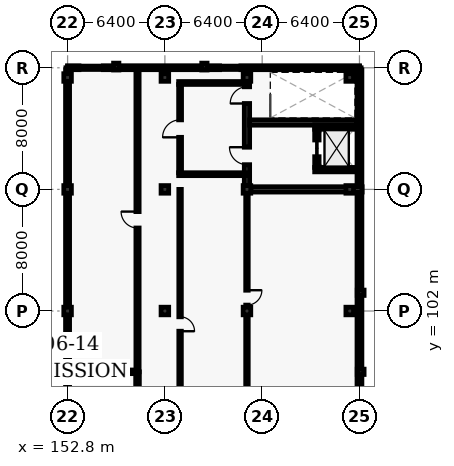
"""IFC4 building model, lengths in metres.
Left out: names, types, materials, properties, quantities, classifications, styles, units other than length and angle.
Written with IfcOpenShell. Run it as: python <this file> out.ifc"""

import sys

from ifc_helpers import new_model, si_unit, direction, frame, frame_2d, origin, origin_2d, place, context, subcontext, project, spatial, rectangle, extrude, element, fill, save


model = new_model("IFC4")
c1 = context("Model", 3, precision=1e-05, world=origin(), true_north=direction((0.0, 1.0)))
c2 = subcontext(c1, "Body", "Model", "MODEL_VIEW")
j1 = project(units=[si_unit("LENGTHUNIT", "METRE"), si_unit("PLANEANGLEUNIT", "RADIAN")], contexts=[c1])
p1 = place(None, origin())
s1 = spatial("IfcSite", under=j1, at=p1, CompositionType="ELEMENT")
p2 = place(p1, origin())
s2 = spatial("IfcBuilding", under=s1, at=p2, CompositionType="ELEMENT")
p3 = place(p2, frame((0.0, 0.0, 29.4)))
s3 = spatial("IfcBuildingStorey", under=s2, at=p3, CompositionType="ELEMENT", Elevation=29.4)
for number, where, z_axis, x_axis in (
    (1, (152.8, 102.0, 0.0), (0.0, 0.0, 1.0), (1.0, 0.0, 0.0)),
    (2, (152.8, 110.0, 0.0), (0.0, 0.0, 1.0), (1.0, 0.0, 0.0)),
    (3, (152.8, 117.36, 0.0), (0.0, 0.0, 1.0), (1.0, 0.0, 0.0)),
    (4, (159.2, 102.0, 0.0), (0.0, 0.0, 1.0), (1.0, 0.0, 0.0)),
    (5, (159.2, 110.0, 0.0), (0.0, 0.0, 1.0), (1.0, 0.0, 0.0)),
    (6, (159.2, 117.36, 0.0), (0.0, 0.0, 1.0), (1.0, 0.0, 0.0)),
    (7, (164.6, 102.0, 0.0), (0.0, 0.0, 1.0), (1.0, 0.0, 0.0)),
    (8, (164.6, 110.0, 0.0), (0.0, 0.0, 1.0), (1.0, 0.0, 0.0)),
    (9, (164.6, 117.36, 0.0), (0.0, 0.0, 1.0), (1.0, 0.0, 0.0)),
    (10, (171.36, 102.0, 0.0), (0.0, 0.0, 1.0), (1.0, 0.0, 0.0)),
    (11, (171.36, 110.0, 0.0), (0.0, 0.0, 1.0), (1.0, 0.0, 0.0)),
    (12, (171.36, 117.36, 0.0), (0.0, 0.0, 1.0), (1.0, 0.0, 0.0)),
):
    element("IfcColumn", number, at=place(p3, frame(where, z_axis=z_axis, x_axis=x_axis)), inside=s3, PredefinedType="COLUMN", context=c2, shape_type="SweptSolid", body=[
        extrude(rectangle(XDim=0.5, YDim=0.5, at=origin_2d()), origin(), (0.0, 0.0, 1.0), 4.5),
    ])
for number, where, z_axis, x_axis in (
    (13, (172.08, 98.0, 0.0), (0.0, 0.0, 1.0), (1.0, 0.0, 0.0)),
    (14, (172.08, 103.2, 0.0), (0.0, 0.0, 1.0), (1.0, 0.0, 0.0)),
    (15, (156.0, 118.08, 0.0), (0.0, 0.0, 1.0), (0.0, 1.0, 0.0)),
    (16, (161.8, 118.08, 0.0), (0.0, 0.0, 1.0), (0.0, 1.0, 0.0)),
):
    element("IfcColumn", number, at=place(p3, frame(where, z_axis=z_axis, x_axis=x_axis)), inside=s3, PredefinedType="PILASTER", context=c2, shape_type="SweptSolid", body=[
        extrude(rectangle(XDim=0.35, YDim=0.45, at=origin_2d()), origin(), (0.0, 0.0, 1.0), 4.5),
    ])
p4 = place(p3, frame((152.8, 118.0, 0.0), z_axis=(0.0, 0.0, 1.0), x_axis=(1.0, 0.0, 0.0)))
e17 = element("IfcWall", 17, at=p4, inside=s3, PredefinedType="SOLIDWALL", context=c2, shape_type="SweptSolid", body=[
    extrude(rectangle(XDim=19.2, YDim=0.25, at=frame_2d((9.6, 0.0))), origin(), (0.0, 0.0, 1.0), 4.255),
])
p5 = place(p4, frame((0.75, 0.0, 0.9)))
e18 = element("IfcOpeningElement", 18, at=p5, cuts=e17, PredefinedType="OPENING", context=c2, shape_type="SweptSolid", body=[
    extrude(rectangle(XDim=1.6, YDim=1.65, at=frame_2d((0.8, 0.825))), frame((0.0, 0.135, 0.0), z_axis=(0.0, -1.0, 0.0), x_axis=(1.0, 0.0, 0.0)), (0.0, 0.0, 1.0), 0.27),
])
p6 = place(p4, frame((10.0, 0.0, 0.9)))
e19 = element("IfcOpeningElement", 19, at=p6, cuts=e17, PredefinedType="OPENING", context=c2, shape_type="SweptSolid", body=[
    extrude(rectangle(XDim=1.4, YDim=2.1, at=frame_2d((0.7, 1.05))), frame((0.0, 0.135, 0.0), z_axis=(0.0, -1.0, 0.0), x_axis=(1.0, 0.0, 0.0)), (0.0, 0.0, 1.0), 0.27),
])
p7 = place(p3, frame((172.0, 117.86, 0.0), z_axis=(0.0, 0.0, 1.0), x_axis=(0.0, -1.0, 0.0)))
e20 = element("IfcWall", 20, at=p7, inside=s3, PredefinedType="SOLIDWALL", context=c2, shape_type="SweptSolid", body=[
    extrude(rectangle(XDim=46.12, YDim=0.32, at=frame_2d((23.06, 0.0))), origin(), (0.0, 0.0, 1.0), 4.255),
])
p8 = place(p3, frame((152.8, 71.74, 0.0), z_axis=(0.0, 0.0, 1.0), x_axis=(0.0, 1.0, 0.0)))
e21 = element("IfcWall", 21, at=p8, inside=s3, PredefinedType="SOLIDWALL", context=c2, shape_type="SweptSolid", body=[
    extrude(rectangle(XDim=46.12, YDim=0.25, at=frame_2d((23.06, 0.0))), origin(), (0.0, 0.0, 1.0), 3.405),
])
p9 = place(p3, frame((152.8, 118.0, 4.5), z_axis=(0.0, 0.0, 1.0), x_axis=(1.0, 0.0, 0.0)))
e22 = element("IfcWall", 22, at=p9, inside=s3, PredefinedType="PARAPET", context=c2, shape_type="SweptSolid", body=[
    extrude(rectangle(XDim=19.2, YDim=0.22, at=frame_2d((9.6, 0.0))), origin(), (0.0, 0.0, 1.0), 0.95),
])
for number, where, z_axis, x_axis in (
    (23, (172.0, 118.0, 4.5), (0.0, 0.0, 1.0), (0.0, -1.0, 0.0)),
    (24, (152.8, 71.6, 4.5), (0.0, 0.0, 1.0), (0.0, 1.0, 0.0)),
):
    element("IfcWall", number, at=place(p3, frame(where, z_axis=z_axis, x_axis=x_axis)), inside=s3, PredefinedType="PARAPET", context=c2, shape_type="SweptSolid", body=[
        extrude(rectangle(XDim=46.4, YDim=0.22, at=frame_2d((23.2, 0.0))), origin(), (0.0, 0.0, 1.0), 0.95),
    ])
p10 = place(p3, frame((164.852, 110.0, 0.0), z_axis=(0.0, 0.0, 1.0), x_axis=(1.0, 0.0, 0.0)))
e25 = element("IfcWall", 25, at=p10, inside=s3, PredefinedType="SHEAR", context=c2, shape_type="SweptSolid", body=[
    extrude(rectangle(XDim=7.323, YDim=0.35, at=frame_2d((3.662, 0.0))), origin(), (0.0, 0.0, 1.0), 4.255),
])
p11 = place(p3, frame((164.6, 110.252, 0.0), z_axis=(0.0, 0.0, 1.0), x_axis=(0.0, 1.0, 0.0)))
e26 = element("IfcWall", 26, at=p11, inside=s3, PredefinedType="SHEAR", context=c2, shape_type="SweptSolid", body=[
    extrude(rectangle(XDim=7.573, YDim=0.35, at=frame_2d((3.787, 0.0))), origin(), (0.0, 0.0, 1.0), 4.255),
])
p12 = place(p11, frame((5.398, 0.0, 0.0)))
e27 = element("IfcOpeningElement", 27, at=p12, cuts=e26, PredefinedType="OPENING", context=c2, shape_type="SweptSolid", body=[
    extrude(rectangle(XDim=1.1, YDim=2.15, at=frame_2d((0.55, 1.075))), frame((0.0, 0.185, 0.0), z_axis=(0.0, -1.0, 0.0), x_axis=(1.0, 0.0, 0.0)), (0.0, 0.0, 1.0), 0.37),
])
p13 = place(p11, frame((1.373, 0.0, 0.0)))
e28 = element("IfcOpeningElement", 28, at=p13, cuts=e26, PredefinedType="OPENING", context=c2, shape_type="SweptSolid", body=[
    extrude(rectangle(XDim=1.15, YDim=2.2, at=frame_2d((0.575, 1.1))), frame((0.0, 0.185, 0.0), z_axis=(0.0, -1.0, 0.0), x_axis=(1.0, 0.0, 0.0)), (0.0, 0.0, 1.0), 0.37),
])
p14 = place(p3, frame((164.775, 114.4, 0.0), z_axis=(0.0, 0.0, 1.0), x_axis=(1.0, 0.0, 0.0)))
e29 = element("IfcWall", 29, at=p14, inside=s3, PredefinedType="SHEAR", context=c2, shape_type="SweptSolid", body=[
    extrude(rectangle(XDim=7.05, YDim=0.35, at=frame_2d((3.525, 0.0))), origin(), (0.0, 0.0, 1.0), 4.255),
])
for number, where, z_axis, x_axis in (
    (30, (169.055, 111.3, 0.0), (0.0, 0.0, 1.0), (1.0, 0.0, 0.0)),
    (31, (169.055, 114.1, 0.0), (0.0, 0.0, 1.0), (1.0, 0.0, 0.0)),
):
    element("IfcWall", number, at=place(p3, frame(where, z_axis=z_axis, x_axis=x_axis)), inside=s3, PredefinedType="SHEAR", context=c2, shape_type="SweptSolid", body=[
        extrude(rectangle(XDim=2.89, YDim=0.29, at=frame_2d((1.445, 0.0))), origin(), (0.0, 0.0, 1.0), 4.255),
    ])
p15 = place(p3, frame((169.2, 111.445, 0.0), z_axis=(0.0, 0.0, 1.0), x_axis=(0.0, 1.0, 0.0)))
e32 = element("IfcWall", 32, at=p15, inside=s3, PredefinedType="SHEAR", context=c2, shape_type="SweptSolid", body=[
    extrude(rectangle(XDim=2.51, YDim=0.29, at=frame_2d((1.255, 0.0))), origin(), (0.0, 0.0, 1.0), 4.255),
])
p16 = place(p15, frame((0.705, 0.0, 0.0)))
e33 = element("IfcOpeningElement", 33, at=p16, cuts=e32, PredefinedType="OPENING", context=c2, shape_type="SweptSolid", body=[
    extrude(rectangle(XDim=1.1, YDim=2.15, at=frame_2d((0.55, 1.075))), frame((0.0, 0.155, 0.0), z_axis=(0.0, -1.0, 0.0), x_axis=(1.0, 0.0, 0.0)), (0.0, 0.0, 1.0), 0.31),
])
p17 = place(p3, frame((160.105, 111.0, 0.0), z_axis=(0.0, 0.0, 1.0), x_axis=(1.0, 0.0, 0.0)))
e34 = element("IfcWall", 34, at=p17, inside=s3, PredefinedType="PARTITIONING", context=c2, shape_type="SweptSolid", body=[
    extrude(rectangle(XDim=4.495, YDim=0.19, at=frame_2d((2.248, 0.0))), origin(), (0.0, 0.0, 1.0), 4.255),
])
p18 = place(p3, frame((160.105, 117.0, 0.0), z_axis=(0.0, 0.0, 1.0), x_axis=(1.0, 0.0, 0.0)))
e35 = element("IfcWall", 35, at=p18, inside=s3, PredefinedType="PARTITIONING", context=c2, shape_type="SweptSolid", body=[
    extrude(rectangle(XDim=4.495, YDim=0.19, at=frame_2d((2.248, 0.0))), origin(), (0.0, 0.0, 1.0), 3.605),
])
p19 = place(p3, frame((160.2, 111.095, 0.0), z_axis=(0.0, 0.0, 1.0), x_axis=(0.0, 1.0, 0.0)))
e36 = element("IfcWall", 36, at=p19, inside=s3, PredefinedType="PARTITIONING", context=c2, shape_type="SweptSolid", body=[
    extrude(rectangle(XDim=5.81, YDim=0.19, at=frame_2d((2.905, 0.0))), origin(), (0.0, 0.0, 1.0), 4.255),
])
p20 = place(p19, frame((2.33, 0.0, 0.0)))
e37 = element("IfcOpeningElement", 37, at=p20, cuts=e36, PredefinedType="OPENING", context=c2, shape_type="SweptSolid", body=[
    extrude(rectangle(XDim=1.15, YDim=2.2, at=frame_2d((0.575, 1.1))), frame((0.0, 0.105, 0.0), z_axis=(0.0, -1.0, 0.0), x_axis=(1.0, 0.0, 0.0)), (0.0, 0.0, 1.0), 0.21),
])
p21 = place(p3, frame((157.4, 78.2, 0.0), z_axis=(0.0, 0.0, 1.0), x_axis=(0.0, 1.0, 0.0)))
e38 = element("IfcWall", 38, at=p21, inside=s3, PredefinedType="PARTITIONING", context=c2, shape_type="SweptSolid", body=[
    extrude(rectangle(XDim=19.8, YDim=0.24, at=frame_2d((9.9, 0.0))), origin(), (0.0, 0.0, 1.0), 4.255),
])
p22 = place(p21, frame((9.4, 0.0, 0.0)))
e39 = element("IfcOpeningElement", 39, at=p22, cuts=e38, PredefinedType="OPENING", context=c2, shape_type="SweptSolid", body=[
    extrude(rectangle(XDim=1.0, YDim=2.1, at=frame_2d((0.5, 1.05))), frame((0.0, 0.13, 0.0), z_axis=(0.0, -1.0, 0.0), x_axis=(1.0, 0.0, 0.0)), (0.0, 0.0, 1.0), 0.26),
])
p23 = place(p3, frame((157.4, 98.0, 0.0), z_axis=(0.0, 0.0, 1.0), x_axis=(0.0, 1.0, 0.0)))
e40 = element("IfcWall", 40, at=p23, inside=s3, PredefinedType="PARTITIONING", context=c2, shape_type="SweptSolid", body=[
    extrude(rectangle(XDim=20.0, YDim=0.21, at=frame_2d((10.0, 0.0))), origin(), (0.0, 0.0, 1.0), 4.255),
])
p24 = place(p23, frame((9.46, 0.0, 0.0)))
e41 = element("IfcOpeningElement", 41, at=p24, cuts=e40, PredefinedType="OPENING", context=c2, shape_type="SweptSolid", body=[
    extrude(rectangle(XDim=1.08, YDim=2.15, at=frame_2d((0.54, 1.075))), frame((0.0, 0.115, 0.0), z_axis=(0.0, -1.0, 0.0), x_axis=(1.0, 0.0, 0.0)), (0.0, 0.0, 1.0), 0.23),
])
p25 = place(p3, frame((160.2, 110.0, 0.0), z_axis=(0.0, 0.0, 1.0), x_axis=(0.0, -1.0, 0.0)))
e42 = element("IfcWall", 42, at=p25, inside=s3, PredefinedType="PARTITIONING", context=c2, shape_type="SweptSolid", body=[
    extrude(rectangle(XDim=16.0, YDim=0.165, at=frame_2d((8.0, 0.0))), origin(), (0.0, 0.0, 1.0), 4.255),
])
p26 = place(p25, frame((8.38, 0.0, 0.0)))
e43 = element("IfcOpeningElement", 43, at=p26, cuts=e42, PredefinedType="OPENING", context=c2, shape_type="SweptSolid", body=[
    extrude(rectangle(XDim=0.95, YDim=2.1, at=frame_2d((0.475, 1.05))), frame((0.0, 0.093, 0.0), z_axis=(0.0, -1.0, 0.0), x_axis=(1.0, 0.0, 0.0)), (0.0, 0.0, 1.0), 0.185),
])
p27 = place(p3, frame((152.8, 98.0, 0.0), z_axis=(0.0, 0.0, 1.0), x_axis=(1.0, 0.0, 0.0)))
e44 = element("IfcWall", 44, at=p27, inside=s3, PredefinedType="PARTITIONING", context=c2, shape_type="SweptSolid", body=[
    extrude(rectangle(XDim=4.6, YDim=0.24, at=frame_2d((2.3, 0.0))), origin(), (0.0, 0.0, 1.0), 4.255),
])
p28 = place(p3, frame((164.6, 109.748, 0.0), z_axis=(0.0, 0.0, 1.0), x_axis=(0.0, -1.0, 0.0)))
e45 = element("IfcWall", 45, at=p28, inside=s3, PredefinedType="PARTITIONING", context=c2, shape_type="SweptSolid", body=[
    extrude(rectangle(XDim=15.496, YDim=0.165, at=frame_2d((7.748, 0.0))), origin(), (0.0, 0.0, 1.0), 3.405),
])
p29 = place(p28, frame((6.38, 0.0, 0.0)))
e46 = element("IfcOpeningElement", 46, at=p29, cuts=e45, PredefinedType="OPENING", context=c2, shape_type="SweptSolid", body=[
    extrude(rectangle(XDim=0.98, YDim=2.1, at=frame_2d((0.49, 1.05))), frame((0.0, 0.093, 0.0), z_axis=(0.0, -1.0, 0.0), x_axis=(1.0, 0.0, 0.0)), (0.0, 0.0, 1.0), 0.185),
])
p30 = place(p5, origin())
e47 = element("IfcWindow", 47, at=p30, inside=s3, PartitioningType="SINGLE_PANEL", PredefinedType="WINDOW", context=c2, shape_type="SweptSolid", body=[
    extrude(rectangle(XDim=1.6, YDim=1.65, at=frame_2d((0.8, 0.825))), frame((0.0, 0.03, 0.0), z_axis=(0.0, -1.0, 0.0), x_axis=(1.0, 0.0, 0.0)), (0.0, 0.0, 1.0), 0.06),
])
fill(e18, e47)
p31 = place(p6, origin())
e48 = element("IfcWindow", 48, at=p31, inside=s3, PartitioningType="SINGLE_PANEL", PredefinedType="WINDOW", context=c2, shape_type="SweptSolid", body=[
    extrude(rectangle(XDim=1.4, YDim=2.1, at=frame_2d((0.7, 1.05))), frame((0.0, 0.03, 0.0), z_axis=(0.0, -1.0, 0.0), x_axis=(1.0, 0.0, 0.0)), (0.0, 0.0, 1.0), 0.06),
])
fill(e19, e48)
p32 = place(p12, origin())
e49 = element("IfcDoor", 49, at=p32, inside=s3, OperationType="SINGLE_SWING_LEFT", PredefinedType="DOOR", context=c2, shape_type="SweptSolid", body=[
    extrude(rectangle(XDim=1.1, YDim=2.15, at=frame_2d((0.55, 1.075))), frame((0.0, 0.025, 0.0), z_axis=(0.0, -1.0, 0.0), x_axis=(1.0, 0.0, 0.0)), (0.0, 0.0, 1.0), 0.05),
])
fill(e27, e49)
p33 = place(p13, origin())
e50 = element("IfcDoor", 50, at=p33, inside=s3, OperationType="SINGLE_SWING_RIGHT", PredefinedType="DOOR", context=c2, shape_type="SweptSolid", body=[
    extrude(rectangle(XDim=1.15, YDim=2.2, at=frame_2d((0.575, 1.1))), frame((0.0, 0.025, 0.0), z_axis=(0.0, -1.0, 0.0), x_axis=(1.0, 0.0, 0.0)), (0.0, 0.0, 1.0), 0.05),
])
fill(e28, e50)
p34 = place(p16, origin())
e51 = element("IfcDoor", 51, at=p34, inside=s3, OperationType="SLIDING_TO_LEFT", PredefinedType="DOOR", context=c2, shape_type="SweptSolid", body=[
    extrude(rectangle(XDim=1.1, YDim=2.15, at=frame_2d((0.55, 1.075))), frame((0.0, 0.025, 0.0), z_axis=(0.0, -1.0, 0.0), x_axis=(1.0, 0.0, 0.0)), (0.0, 0.0, 1.0), 0.05),
])
fill(e33, e51)
p35 = place(p20, origin())
e52 = element("IfcDoor", 52, at=p35, inside=s3, OperationType="SINGLE_SWING_LEFT", PredefinedType="DOOR", context=c2, shape_type="SweptSolid", body=[
    extrude(rectangle(XDim=1.15, YDim=2.2, at=frame_2d((0.575, 1.1))), frame((0.0, 0.025, 0.0), z_axis=(0.0, -1.0, 0.0), x_axis=(1.0, 0.0, 0.0)), (0.0, 0.0, 1.0), 0.05),
])
fill(e37, e52)
p36 = place(p24, origin())
e53 = element("IfcDoor", 53, at=p36, inside=s3, OperationType="SINGLE_SWING_RIGHT", PredefinedType="DOOR", context=c2, shape_type="SweptSolid", body=[
    extrude(rectangle(XDim=1.08, YDim=2.15, at=frame_2d((0.54, 1.075))), frame((0.0, 0.025, 0.0), z_axis=(0.0, -1.0, 0.0), x_axis=(1.0, 0.0, 0.0)), (0.0, 0.0, 1.0), 0.05),
])
fill(e41, e53)
p37 = place(p26, origin())
e54 = element("IfcDoor", 54, at=p37, inside=s3, OperationType="SINGLE_SWING_RIGHT", PredefinedType="DOOR", context=c2, shape_type="SweptSolid", body=[
    extrude(rectangle(XDim=0.95, YDim=2.1, at=frame_2d((0.475, 1.05))), frame((0.0, 0.025, 0.0), z_axis=(0.0, -1.0, 0.0), x_axis=(1.0, 0.0, 0.0)), (0.0, 0.0, 1.0), 0.05),
])
fill(e43, e54)
p38 = place(p29, origin())
e55 = element("IfcDoor", 55, at=p38, inside=s3, OperationType="SINGLE_SWING_LEFT", PredefinedType="DOOR", context=c2, shape_type="SweptSolid", body=[
    extrude(rectangle(XDim=0.98, YDim=2.1, at=frame_2d((0.49, 1.05))), frame((0.0, 0.025, 0.0), z_axis=(0.0, -1.0, 0.0), x_axis=(1.0, 0.0, 0.0)), (0.0, 0.0, 1.0), 0.05),
])
fill(e46, e55)
save(model, sys.argv[1])
